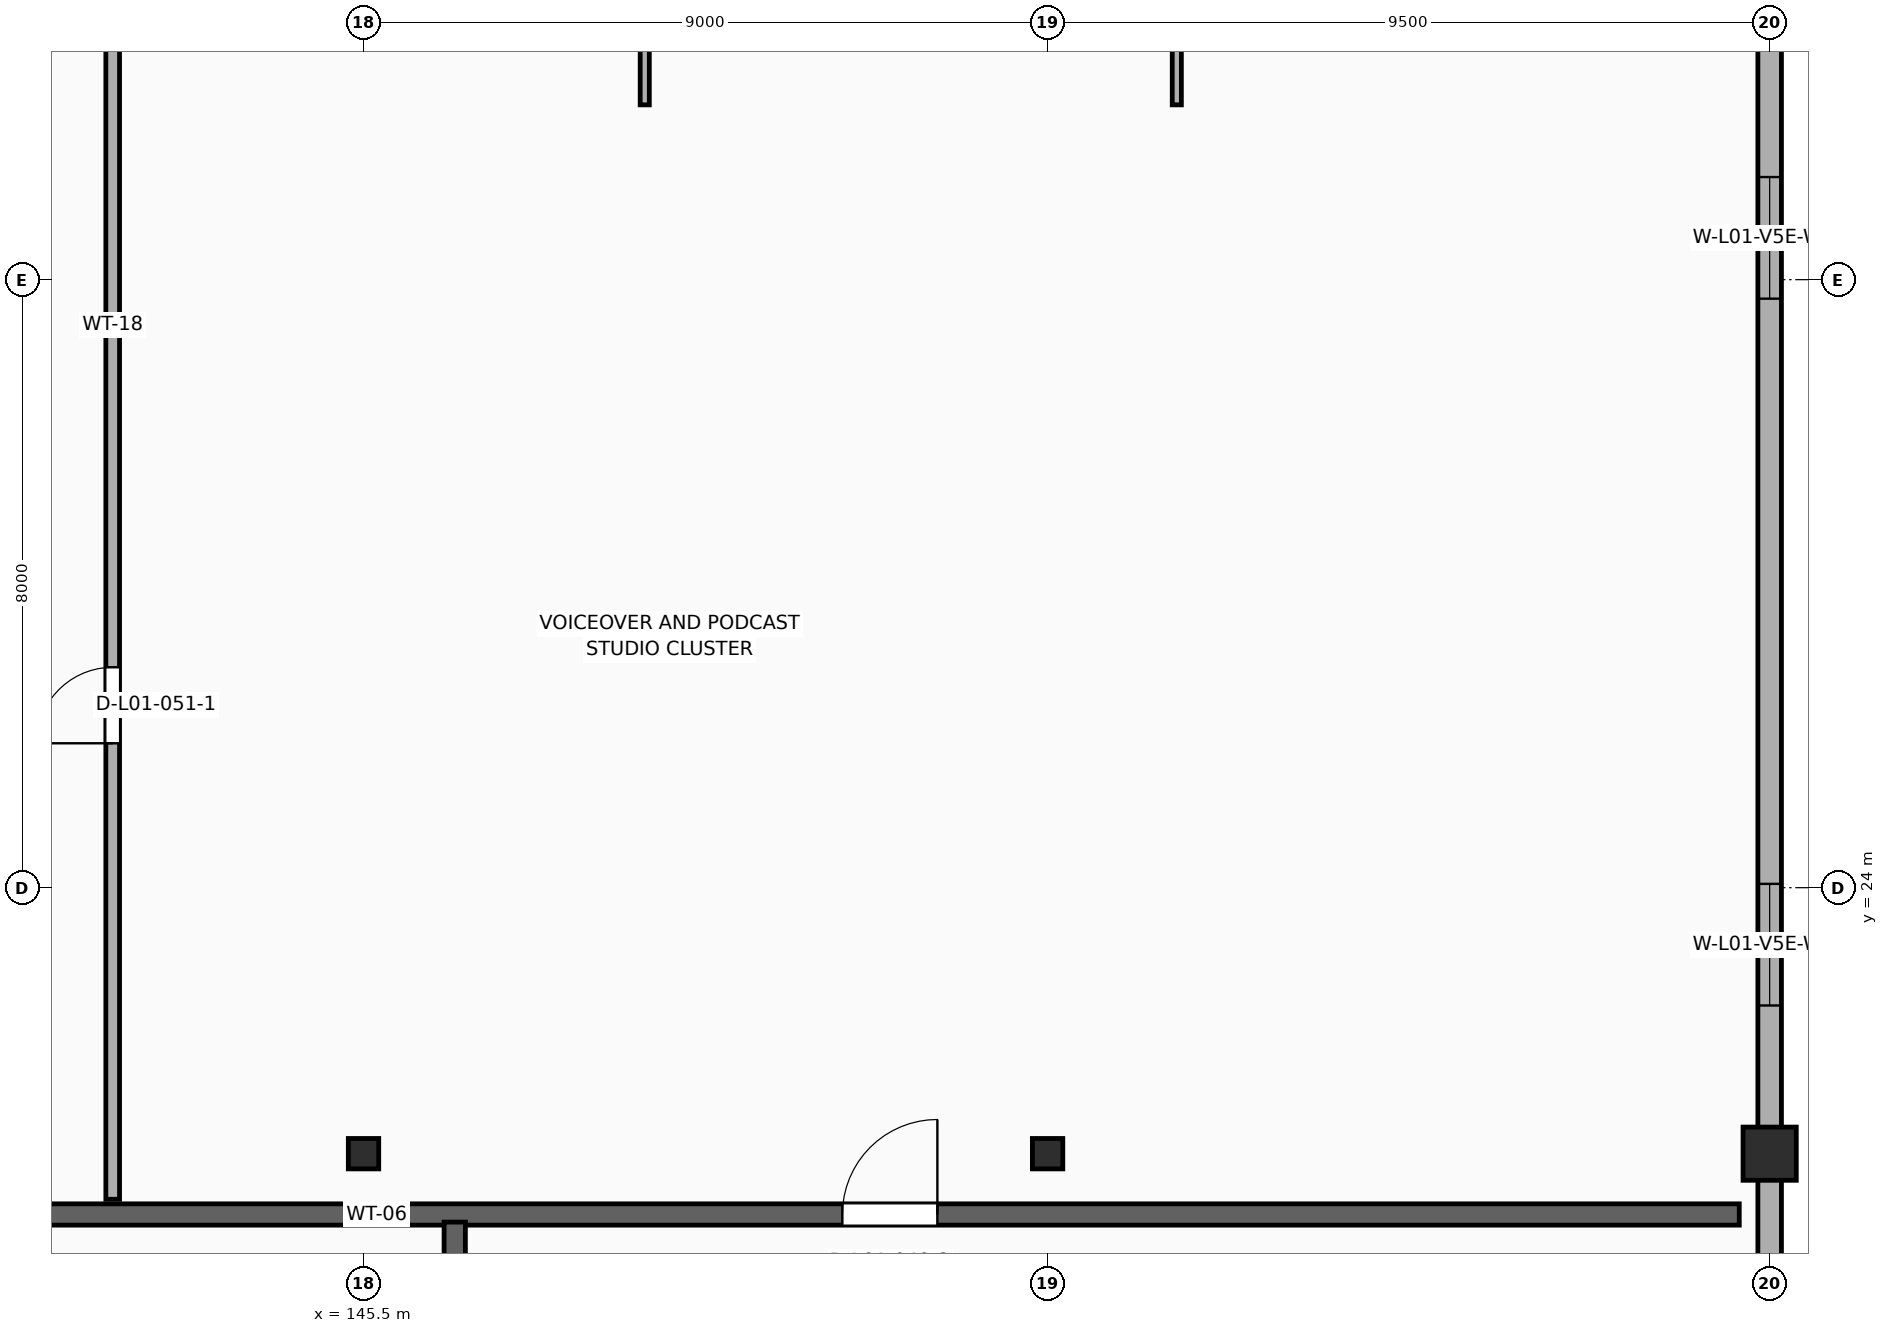
"""IFC4 building model, lengths in metres.
Left out: names, types, materials, properties, quantities, classifications, styles, units other than length and angle.
Written with IfcOpenShell. Run it as: python <this file> out.ifc"""

import sys

from ifc_helpers import new_model, si_unit, direction, frame, frame_2d, origin, origin_2d, place, context, subcontext, project, spatial, rectangle, hollow_rectangle, extrude, element, fill, save


model = new_model("IFC4")
c1 = context("Model", 3, precision=1e-05, world=origin(), true_north=direction((0.0, 1.0)))
c2 = subcontext(c1, "Body", "Model", "MODEL_VIEW")
j1 = project(units=[si_unit("LENGTHUNIT", "METRE"), si_unit("PLANEANGLEUNIT", "RADIAN")], contexts=[c1])
p1 = place(None, origin())
s1 = spatial("IfcSite", under=j1, at=p1, CompositionType="ELEMENT")
p2 = place(p1, origin())
s2 = spatial("IfcBuilding", under=s1, at=p2, CompositionType="ELEMENT")
p3 = place(p2, frame((0.0, 0.0, 5.4)))
s3 = spatial("IfcBuildingStorey", under=s2, at=p3, CompositionType="ELEMENT", Elevation=5.4)
for number, where, z_axis, x_axis in (
    (1, (145.5, 20.5, 0.0), (0.0, 0.0, 1.0), (1.0, 0.0, 0.0)),
    (2, (154.5, 20.5, 0.0), (0.0, 0.0, 1.0), (1.0, 0.0, 0.0)),
):
    element("IfcColumn", number, at=place(p3, frame(where, z_axis=z_axis, x_axis=x_axis)), inside=s3, PredefinedType="COLUMN", context=c2, shape_type="SweptSolid", body=[
        extrude(hollow_rectangle(XDim=0.4, YDim=0.4, WallThickness=0.016, at=origin_2d()), origin(), (0.0, 0.0, 1.0), 4.54),
    ])
p4 = place(p3, frame((164.0, 20.5, 0.0), z_axis=(0.0, 0.0, 1.0), x_axis=(1.0, 0.0, 0.0)))
e3 = element("IfcColumn", 3, at=p4, inside=s3, PredefinedType="COLUMN", context=c2, shape_type="SweptSolid", body=[
    extrude(rectangle(XDim=0.7, YDim=0.7, at=origin_2d()), origin(), (0.0, 0.0, 1.0), 4.54),
])
p5 = place(p3, frame((164.0, 0.0, 0.0), z_axis=(0.0, 0.0, 1.0), x_axis=(0.0, 1.0, 0.0)))
e4 = element("IfcWall", 4, at=p5, inside=s3, PredefinedType="STANDARD", context=c2, shape_type="SweptSolid", body=[
    extrude(rectangle(XDim=46.5, YDim=0.31, at=frame_2d((23.25, 0.0))), origin(), (0.0, 0.0, 1.0), 4.198),
])
p6 = place(p5, frame((3.85, 0.0, 1.0)))
e5 = element("IfcOpeningElement", 5, at=p6, cuts=e4, PredefinedType="OPENING", context=c2, shape_type="SweptSolid", body=[
    extrude(rectangle(XDim=1.6, YDim=2.2, at=frame_2d((0.8, 1.1))), frame((0.0, 0.167, 0.0), z_axis=(0.0, -1.0, 0.0), x_axis=(1.0, 0.0, 0.0)), (0.0, 0.0, 1.0), 0.334),
])
p7 = place(p5, frame((13.15, 0.0, 1.0)))
e6 = element("IfcOpeningElement", 6, at=p7, cuts=e4, PredefinedType="OPENING", context=c2, shape_type="SweptSolid", body=[
    extrude(rectangle(XDim=1.6, YDim=2.2, at=frame_2d((0.8, 1.1))), frame((0.0, 0.167, 0.0), z_axis=(0.0, -1.0, 0.0), x_axis=(1.0, 0.0, 0.0)), (0.0, 0.0, 1.0), 0.334),
])
p8 = place(p5, frame((22.45, 0.0, 1.0)))
e7 = element("IfcOpeningElement", 7, at=p8, cuts=e4, PredefinedType="OPENING", context=c2, shape_type="SweptSolid", body=[
    extrude(rectangle(XDim=1.6, YDim=2.2, at=frame_2d((0.8, 1.1))), frame((0.0, 0.167, 0.0), z_axis=(0.0, -1.0, 0.0), x_axis=(1.0, 0.0, 0.0)), (0.0, 0.0, 1.0), 0.334),
])
p9 = place(p5, frame((31.75, 0.0, 1.0)))
e8 = element("IfcOpeningElement", 8, at=p9, cuts=e4, PredefinedType="OPENING", context=c2, shape_type="SweptSolid", body=[
    extrude(rectangle(XDim=1.6, YDim=2.2, at=frame_2d((0.8, 1.1))), frame((0.0, 0.167, 0.0), z_axis=(0.0, -1.0, 0.0), x_axis=(1.0, 0.0, 0.0)), (0.0, 0.0, 1.0), 0.334),
])
p10 = place(p5, frame((41.05, 0.0, 1.0)))
e9 = element("IfcOpeningElement", 9, at=p10, cuts=e4, PredefinedType="OPENING", context=c2, shape_type="SweptSolid", body=[
    extrude(rectangle(XDim=1.6, YDim=2.2, at=frame_2d((0.8, 1.1))), frame((0.0, 0.167, 0.0), z_axis=(0.0, -1.0, 0.0), x_axis=(1.0, 0.0, 0.0)), (0.0, 0.0, 1.0), 0.334),
])
p11 = place(p3, frame((127.8, 19.7, 0.0), z_axis=(0.0, 0.0, 1.0), x_axis=(1.0, 0.0, 0.0)))
e10 = element("IfcWall", 10, at=p11, inside=s3, PredefinedType="STANDARD", context=c2, shape_type="SweptSolid", body=[
    extrude(rectangle(XDim=35.8, YDim=0.28, at=frame_2d((17.9, 0.0))), origin(), (0.0, 0.0, 1.0), 4.5),
])
p12 = place(p11, frame((10.5, 0.0, 0.0)))
e11 = element("IfcOpeningElement", 11, at=p12, cuts=e10, PredefinedType="OPENING", context=c2, shape_type="SweptSolid", body=[
    extrude(rectangle(XDim=1.25, YDim=2.25, at=frame_2d((0.625, 1.125))), frame((0.0, 0.152, 0.0), z_axis=(0.0, -1.0, 0.0), x_axis=(1.0, 0.0, 0.0)), (0.0, 0.0, 1.0), 0.304),
])
p13 = place(p11, frame((24.0, 0.0, 0.0)))
e12 = element("IfcOpeningElement", 12, at=p13, cuts=e10, PredefinedType="OPENING", context=c2, shape_type="SweptSolid", body=[
    extrude(rectangle(XDim=1.25, YDim=2.25, at=frame_2d((0.625, 1.125))), frame((0.0, 0.152, 0.0), z_axis=(0.0, -1.0, 0.0), x_axis=(1.0, 0.0, 0.0)), (0.0, 0.0, 1.0), 0.304),
])
p14 = place(p3, frame((146.7, 0.4, 0.0), z_axis=(0.0, 0.0, 1.0), x_axis=(0.0, 1.0, 0.0)))
e13 = element("IfcWall", 13, at=p14, inside=s3, PredefinedType="STANDARD", context=c2, shape_type="SweptSolid", body=[
    extrude(rectangle(XDim=19.2, YDim=0.28, at=frame_2d((9.6, 0.0))), origin(), (0.0, 0.0, 1.0), 4.5),
])
p15 = place(p3, frame((142.2, 19.9, 0.0), z_axis=(0.0, 0.0, 1.0), x_axis=(0.0, 1.0, 0.0)))
e14 = element("IfcWall", 14, at=p15, inside=s3, PredefinedType="PARTITIONING", context=c2, shape_type="SweptSolid", body=[
    extrude(rectangle(XDim=26.3, YDim=0.18, at=frame_2d((13.15, 0.0))), origin(), (0.0, 0.0, 1.0), 4.148),
])
p16 = place(p15, frame((6.0, 0.0, 0.0)))
e15 = element("IfcOpeningElement", 15, at=p16, cuts=e14, PredefinedType="OPENING", context=c2, shape_type="SweptSolid", body=[
    extrude(rectangle(XDim=1.0, YDim=2.15, at=frame_2d((0.5, 1.075))), frame((0.0, 0.102, 0.0), z_axis=(0.0, -1.0, 0.0), x_axis=(1.0, 0.0, 0.0)), (0.0, 0.0, 1.0), 0.204),
])
p17 = place(p15, frame((16.0, 0.0, 0.0)))
e16 = element("IfcOpeningElement", 16, at=p17, cuts=e14, PredefinedType="OPENING", context=c2, shape_type="SweptSolid", body=[
    extrude(rectangle(XDim=0.9, YDim=2.15, at=frame_2d((0.45, 1.075))), frame((0.0, 0.102, 0.0), z_axis=(0.0, -1.0, 0.0), x_axis=(1.0, 0.0, 0.0)), (0.0, 0.0, 1.0), 0.204),
])
p18 = place(p15, frame((22.5, 0.0, 0.0)))
e17 = element("IfcOpeningElement", 17, at=p18, cuts=e14, PredefinedType="OPENING", context=c2, shape_type="SweptSolid", body=[
    extrude(rectangle(XDim=0.9, YDim=2.1, at=frame_2d((0.45, 1.05))), frame((0.0, 0.102, 0.0), z_axis=(0.0, -1.0, 0.0), x_axis=(1.0, 0.0, 0.0)), (0.0, 0.0, 1.0), 0.204),
])
p19 = place(p3, frame((149.2, 34.3, 0.0), z_axis=(0.0, 0.0, 1.0), x_axis=(0.0, 1.0, 0.0)))
e18 = element("IfcWall", 18, at=p19, inside=s3, PredefinedType="PARTITIONING", context=c2, shape_type="SweptSolid", body=[
    extrude(rectangle(XDim=5.9, YDim=0.12, at=frame_2d((2.95, 0.0))), origin(), (0.0, 0.0, 1.0), 4.198),
])
p20 = place(p19, frame((2.0, 0.0, 0.0)))
e19 = element("IfcOpeningElement", 19, at=p20, cuts=e18, PredefinedType="OPENING", context=c2, shape_type="SweptSolid", body=[
    extrude(rectangle(XDim=0.9, YDim=2.15, at=frame_2d((0.45, 1.075))), frame((0.0, 0.072, 0.0), z_axis=(0.0, -1.0, 0.0), x_axis=(1.0, 0.0, 0.0)), (0.0, 0.0, 1.0), 0.144),
])
p21 = place(p3, frame((156.2, 34.3, 0.0), z_axis=(0.0, 0.0, 1.0), x_axis=(0.0, 1.0, 0.0)))
e20 = element("IfcWall", 20, at=p21, inside=s3, PredefinedType="PARTITIONING", context=c2, shape_type="SweptSolid", body=[
    extrude(rectangle(XDim=5.9, YDim=0.12, at=frame_2d((2.95, 0.0))), origin(), (0.0, 0.0, 1.0), 3.85),
])
p22 = place(p21, frame((2.0, 0.0, 0.0)))
e21 = element("IfcOpeningElement", 21, at=p22, cuts=e20, PredefinedType="OPENING", context=c2, shape_type="SweptSolid", body=[
    extrude(rectangle(XDim=0.95, YDim=2.15, at=frame_2d((0.475, 1.075))), frame((0.0, 0.072, 0.0), z_axis=(0.0, -1.0, 0.0), x_axis=(1.0, 0.0, 0.0)), (0.0, 0.0, 1.0), 0.144),
])
p23 = place(p8, origin())
e22 = element("IfcWindow", 22, at=p23, inside=s3, PartitioningType="SINGLE_PANEL", PredefinedType="WINDOW", context=c2, shape_type="SweptSolid", body=[
    extrude(rectangle(XDim=1.6, YDim=2.2, at=frame_2d((0.8, 1.1))), frame((0.0, 0.03, 0.0), z_axis=(0.0, -1.0, 0.0), x_axis=(1.0, 0.0, 0.0)), (0.0, 0.0, 1.0), 0.06),
])
fill(e7, e22)
p24 = place(p9, origin())
e23 = element("IfcWindow", 23, at=p24, inside=s3, PartitioningType="SINGLE_PANEL", PredefinedType="WINDOW", context=c2, shape_type="SweptSolid", body=[
    extrude(rectangle(XDim=1.6, YDim=2.2, at=frame_2d((0.8, 1.1))), frame((0.0, 0.03, 0.0), z_axis=(0.0, -1.0, 0.0), x_axis=(1.0, 0.0, 0.0)), (0.0, 0.0, 1.0), 0.06),
])
fill(e8, e23)
p25 = place(p13, origin())
e24 = element("IfcDoor", 24, at=p25, inside=s3, OperationType="SINGLE_SWING_RIGHT", PredefinedType="DOOR", context=c2, shape_type="SweptSolid", body=[
    extrude(rectangle(XDim=1.25, YDim=2.25, at=frame_2d((0.625, 1.125))), frame((0.0, 0.025, 0.0), z_axis=(0.0, -1.0, 0.0), x_axis=(1.0, 0.0, 0.0)), (0.0, 0.0, 1.0), 0.05),
])
fill(e12, e24)
p26 = place(p16, origin())
e25 = element("IfcDoor", 25, at=p26, inside=s3, OperationType="SINGLE_SWING_LEFT", PredefinedType="DOOR", context=c2, shape_type="SweptSolid", body=[
    extrude(rectangle(XDim=1.0, YDim=2.15, at=frame_2d((0.5, 1.075))), frame((0.0, 0.025, 0.0), z_axis=(0.0, -1.0, 0.0), x_axis=(1.0, 0.0, 0.0)), (0.0, 0.0, 1.0), 0.05),
])
fill(e15, e25)
save(model, sys.argv[1])
